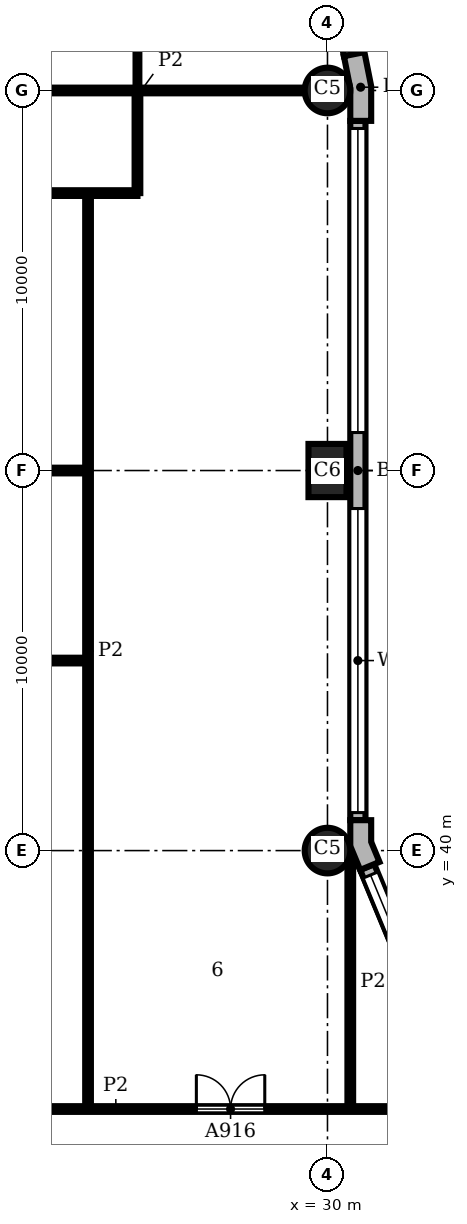
"""IFC4 building model, lengths in metres.
Left out: names, types, materials, properties, quantities, classifications, styles, units other than length and angle.
Written with IfcOpenShell. Run it as: python <this file> out.ifc"""

import sys

from ifc_helpers import new_model, si_unit, direction, frame, frame_2d, origin, origin_2d, place, context, subcontext, project, spatial, polyline, rectangle, circle, outline, extrude, element, fill, save


model = new_model("IFC4")
c1 = context("Model", 3, precision=1e-05, world=origin(), true_north=direction((0.0, 1.0)))
c2 = subcontext(c1, "Body", "Model", "MODEL_VIEW")
j1 = project(units=[si_unit("LENGTHUNIT", "METRE"), si_unit("PLANEANGLEUNIT", "RADIAN")], contexts=[c1])
p1 = place(None, origin())
s1 = spatial("IfcSite", under=j1, at=p1, CompositionType="ELEMENT")
p2 = place(p1, origin())
s2 = spatial("IfcBuilding", under=s1, at=p2, CompositionType="ELEMENT")
p3 = place(p2, frame((0.0, 0.0, 113.4)))
s3 = spatial("IfcBuildingStorey", under=s2, at=p3, CompositionType="ELEMENT", Elevation=113.4)
p4 = place(p3, frame((30.0, 40.0, 0.0), z_axis=(0.0, 0.0, 1.0), x_axis=(1.0, 0.0, 0.0)))
e1 = element("IfcColumn", 1, at=p4, inside=s3, PredefinedType="COLUMN", context=c2, shape_type="SweptSolid", body=[
    extrude(circle(Radius=0.6, at=origin_2d()), origin(), (0.0, 0.0, 1.0), 3.9),
])
p5 = place(p3, frame((30.0, 50.0, 0.0), z_axis=(0.0, 0.0, 1.0), x_axis=(0.0, 1.0, 0.0)))
e2 = element("IfcColumn", 2, at=p5, inside=s3, PredefinedType="COLUMN", context=c2, shape_type="SweptSolid", body=[
    extrude(rectangle(XDim=1.4, YDim=1.0, at=origin_2d()), origin(), (0.0, 0.0, 1.0), 3.9),
])
p6 = place(p3, frame((30.0, 60.0, 0.0), z_axis=(0.0, 0.0, 1.0), x_axis=(1.0, 0.0, 0.0)))
e3 = element("IfcColumn", 3, at=p6, inside=s3, PredefinedType="COLUMN", context=c2, shape_type="SweptSolid", body=[
    extrude(circle(Radius=0.6, at=origin_2d()), origin(), (0.0, 0.0, 1.0), 3.9),
])
p7 = place(p3, origin())
e4 = element("IfcWall", 4, at=p7, inside=s3, PredefinedType="SOLIDWALL", context=c2, shape_type="SweptSolid", body=[
    extrude(outline(polyline([(31.23, 39.644), (31.369, 39.701), (31.15, 40.229), (31.15, 40.8), (31.0, 40.8), (30.6, 40.8), (30.6, 40.119), (30.861, 39.49), (31.23, 39.644)])), origin(), (0.0, 0.0, 1.0), 3.9),
])
e5 = element("IfcWall", 5, at=p7, inside=s3, PredefinedType="SOLIDWALL", context=c2, shape_type="SweptSolid", body=[
    extrude(outline(polyline([(31.0, 59.2), (31.15, 59.2), (31.15, 60.113), (30.972, 61.009), (30.825, 60.98), (30.432, 60.902), (30.6, 60.059), (30.6, 59.2), (31.0, 59.2)])), origin(), (0.0, 0.0, 1.0), 3.9),
])
p8 = place(p3, frame((33.362, 33.974, 0.0), z_axis=(0.0, 0.0, 1.0), x_axis=(-0.382655745237, 0.923891000409, 0.0)))
e6 = element("IfcWall", 6, at=p8, inside=s3, PredefinedType="SOLIDWALL", context=c2, shape_type="SweptSolid", body=[
    extrude(rectangle(XDim=6.053, YDim=0.4, at=frame_2d((3.027, 0.0))), origin(), (0.0, 0.0, 1.0), 3.9),
])
p9 = place(p8, frame((0.227, 0.0, 0.9)))
e7 = element("IfcOpeningElement", 7, at=p9, cuts=e6, PredefinedType="OPENING", context=c2, shape_type="SweptSolid", body=[
    extrude(rectangle(XDim=5.6, YDim=2.35, at=frame_2d((2.8, 1.175))), frame((0.0, 0.21, 0.0), z_axis=(0.0, -1.0, 0.0), x_axis=(1.0, 0.0, 0.0)), (0.0, 0.0, 1.0), 0.42),
])
p10 = place(p3, frame((30.8, 40.8, 0.0), z_axis=(0.0, 0.0, 1.0), x_axis=(0.0, 1.0, 0.0)))
e8 = element("IfcWall", 8, at=p10, inside=s3, PredefinedType="SOLIDWALL", context=c2, shape_type="SweptSolid", body=[
    extrude(rectangle(XDim=18.4, YDim=0.4, at=frame_2d((9.2, 0.0))), origin(), (0.0, 0.0, 1.0), 3.9),
])
p11 = place(p10, frame((0.2, 0.0, 0.9)))
e9 = element("IfcOpeningElement", 9, at=p11, cuts=e8, PredefinedType="OPENING", context=c2, shape_type="SweptSolid", body=[
    extrude(rectangle(XDim=8.0, YDim=2.35, at=frame_2d((4.0, 1.175))), frame((0.0, 0.21, 0.0), z_axis=(0.0, -1.0, 0.0), x_axis=(1.0, 0.0, 0.0)), (0.0, 0.0, 1.0), 0.42),
])
p12 = place(p10, frame((10.2, 0.0, 0.9)))
e10 = element("IfcOpeningElement", 10, at=p12, cuts=e8, PredefinedType="OPENING", context=c2, shape_type="SweptSolid", body=[
    extrude(rectangle(XDim=8.0, YDim=2.35, at=frame_2d((4.0, 1.175))), frame((0.0, 0.21, 0.0), z_axis=(0.0, -1.0, 0.0), x_axis=(1.0, 0.0, 0.0)), (0.0, 0.0, 1.0), 0.42),
])
p13 = place(p3, frame((30.629, 60.941, 0.0), z_axis=(0.0, 0.0, 1.0), x_axis=(-0.195098533057, 0.98078364709, 0.0)))
e11 = element("IfcWall", 11, at=p13, inside=s3, PredefinedType="SOLIDWALL", context=c2, shape_type="SweptSolid", body=[
    extrude(rectangle(XDim=4.753, YDim=0.4, at=frame_2d((2.376, 0.0))), origin(), (0.0, 0.0, 1.0), 3.9),
])
p14 = place(p13, frame((0.226, 0.0, 0.9)))
e12 = element("IfcOpeningElement", 12, at=p14, cuts=e11, PredefinedType="OPENING", context=c2, shape_type="SweptSolid", body=[
    extrude(rectangle(XDim=4.3, YDim=2.35, at=frame_2d((2.15, 1.175))), frame((0.0, 0.21, 0.0), z_axis=(0.0, -1.0, 0.0), x_axis=(1.0, 0.0, 0.0)), (0.0, 0.0, 1.0), 0.42),
])
p15 = place(p3, frame((25.0, 60.0, 0.0), z_axis=(0.0, 0.0, 1.0), x_axis=(0.0, 1.0, 0.0)))
e13 = element("IfcWall", 13, at=p15, inside=s3, PredefinedType="PARTITIONING", context=c2, shape_type="SweptSolid", body=[
    extrude(rectangle(XDim=8.0, YDim=0.1, at=frame_2d((4.0, 0.0))), origin(), (0.0, 0.0, 1.0), 3.45),
])
p16 = place(p15, frame((4.35, 0.0, 0.0)))
e14 = element("IfcOpeningElement", 14, at=p16, cuts=e13, PredefinedType="OPENING", context=c2, shape_type="SweptSolid", body=[
    extrude(rectangle(XDim=0.9, YDim=2.1, at=frame_2d((0.45, 1.05))), frame((0.0, 0.06, 0.0), z_axis=(0.0, -1.0, 0.0), x_axis=(1.0, 0.0, 0.0)), (0.0, 0.0, 1.0), 0.12),
])
p17 = place(p3, frame((23.7, 33.2, 0.0), z_axis=(0.0, 0.0, 1.0), x_axis=(0.0, 1.0, 0.0)))
e15 = element("IfcWall", 15, at=p17, inside=s3, PredefinedType="PARTITIONING", context=c2, shape_type="SweptSolid", body=[
    extrude(rectangle(XDim=24.1, YDim=0.15, at=frame_2d((12.05, 0.0))), origin(), (0.0, 0.0, 1.0), 3.45),
])
p18 = place(p3, frame((25.0, 57.3, 0.0), z_axis=(0.0, 0.0, 1.0), x_axis=(0.0, 1.0, 0.0)))
e16 = element("IfcWall", 16, at=p18, inside=s3, PredefinedType="PARTITIONING", context=c2, shape_type="SweptSolid", body=[
    extrude(rectangle(XDim=2.7, YDim=0.15, at=frame_2d((1.35, 0.0))), origin(), (0.0, 0.0, 1.0), 3.45),
])
p19 = place(p3, frame((30.6, 33.2, 0.0), z_axis=(0.0, 0.0, 1.0), x_axis=(0.0, 1.0, 0.0)))
e17 = element("IfcWall", 17, at=p19, inside=s3, PredefinedType="PARTITIONING", context=c2, shape_type="SweptSolid", body=[
    extrude(rectangle(XDim=6.699, YDim=0.15, at=frame_2d((3.35, 0.0))), origin(), (0.0, 0.0, 1.0), 3.45),
])
p20 = place(p3, frame((16.5, 33.2, 0.0), z_axis=(0.0, 0.0, 1.0), x_axis=(1.0, 0.0, 0.0)))
e18 = element("IfcWall", 18, at=p20, inside=s3, PredefinedType="PARTITIONING", context=c2, shape_type="SweptSolid", body=[
    extrude(rectangle(XDim=15.862, YDim=0.15, at=frame_2d((7.931, 0.0))), origin(), (0.0, 0.0, 1.0), 3.45),
])
p21 = place(p20, frame((10.05, 0.0, 0.0)))
e19 = element("IfcOpeningElement", 19, at=p21, cuts=e18, PredefinedType="OPENING", context=c2, shape_type="SweptSolid", body=[
    extrude(rectangle(XDim=1.8, YDim=2.1, at=frame_2d((0.9, 1.05))), frame((0.0, 0.085, 0.0), z_axis=(0.0, -1.0, 0.0), x_axis=(1.0, 0.0, 0.0)), (0.0, 0.0, 1.0), 0.17),
])
p22 = place(p3, frame((16.5, 45.0, 0.0), z_axis=(0.0, 0.0, 1.0), x_axis=(1.0, 0.0, 0.0)))
e20 = element("IfcWall", 20, at=p22, inside=s3, PredefinedType="PARTITIONING", context=c2, shape_type="SweptSolid", body=[
    extrude(rectangle(XDim=7.2, YDim=0.15, at=frame_2d((3.6, 0.0))), origin(), (0.0, 0.0, 1.0), 3.45),
])
p23 = place(p3, frame((20.8, 50.0, 0.0), z_axis=(0.0, 0.0, 1.0), x_axis=(1.0, 0.0, 0.0)))
e21 = element("IfcWall", 21, at=p23, inside=s3, PredefinedType="PARTITIONING", context=c2, shape_type="SweptSolid", body=[
    extrude(rectangle(XDim=2.9, YDim=0.15, at=frame_2d((1.45, 0.0))), origin(), (0.0, 0.0, 1.0), 3.45),
])
p24 = place(p3, frame((16.5, 57.3, 0.0), z_axis=(0.0, 0.0, 1.0), x_axis=(1.0, 0.0, 0.0)))
e22 = element("IfcWall", 22, at=p24, inside=s3, PredefinedType="PARTITIONING", context=c2, shape_type="SweptSolid", body=[
    extrude(rectangle(XDim=8.5, YDim=0.15, at=frame_2d((4.25, 0.0))), origin(), (0.0, 0.0, 1.0), 3.45),
])
p25 = place(p3, frame((20.8, 60.0, 0.0), z_axis=(0.0, 0.0, 1.0), x_axis=(1.0, 0.0, 0.0)))
e23 = element("IfcWall", 23, at=p25, inside=s3, PredefinedType="PARTITIONING", context=c2, shape_type="SweptSolid", body=[
    extrude(rectangle(XDim=8.6, YDim=0.15, at=frame_2d((4.3, 0.0))), origin(), (0.0, 0.0, 1.0), 3.45),
])
p26 = place(p9, origin())
e24 = element("IfcWindow", 24, at=p26, inside=s3, PartitioningType="SINGLE_PANEL", PredefinedType="WINDOW", context=c2, shape_type="SweptSolid", body=[
    extrude(rectangle(XDim=5.6, YDim=2.35, at=frame_2d((2.8, 1.175))), frame((0.0, 0.16, 0.0), z_axis=(0.0, -1.0, 0.0), x_axis=(1.0, 0.0, 0.0)), (0.0, 0.0, 1.0), 0.06),
])
fill(e7, e24)
p27 = place(p11, origin())
e25 = element("IfcWindow", 25, at=p27, inside=s3, PartitioningType="SINGLE_PANEL", PredefinedType="WINDOW", context=c2, shape_type="SweptSolid", body=[
    extrude(rectangle(XDim=8.0, YDim=2.35, at=frame_2d((4.0, 1.175))), frame((0.0, 0.16, 0.0), z_axis=(0.0, -1.0, 0.0), x_axis=(1.0, 0.0, 0.0)), (0.0, 0.0, 1.0), 0.06),
])
fill(e9, e25)
p28 = place(p12, origin())
e26 = element("IfcWindow", 26, at=p28, inside=s3, PartitioningType="SINGLE_PANEL", PredefinedType="WINDOW", context=c2, shape_type="SweptSolid", body=[
    extrude(rectangle(XDim=8.0, YDim=2.35, at=frame_2d((4.0, 1.175))), frame((0.0, 0.16, 0.0), z_axis=(0.0, -1.0, 0.0), x_axis=(1.0, 0.0, 0.0)), (0.0, 0.0, 1.0), 0.06),
])
fill(e10, e26)
p29 = place(p21, origin())
e27 = element("IfcDoor", 27, at=p29, inside=s3, OperationType="DOUBLE_DOOR_SINGLE_SWING", PredefinedType="DOOR", context=c2, shape_type="SweptSolid", body=[
    extrude(rectangle(XDim=1.8, YDim=2.1, at=frame_2d((0.9, 1.05))), frame((0.0, 0.025, 0.0), z_axis=(0.0, -1.0, 0.0), x_axis=(1.0, 0.0, 0.0)), (0.0, 0.0, 1.0), 0.05),
])
fill(e19, e27)
save(model, sys.argv[1])
